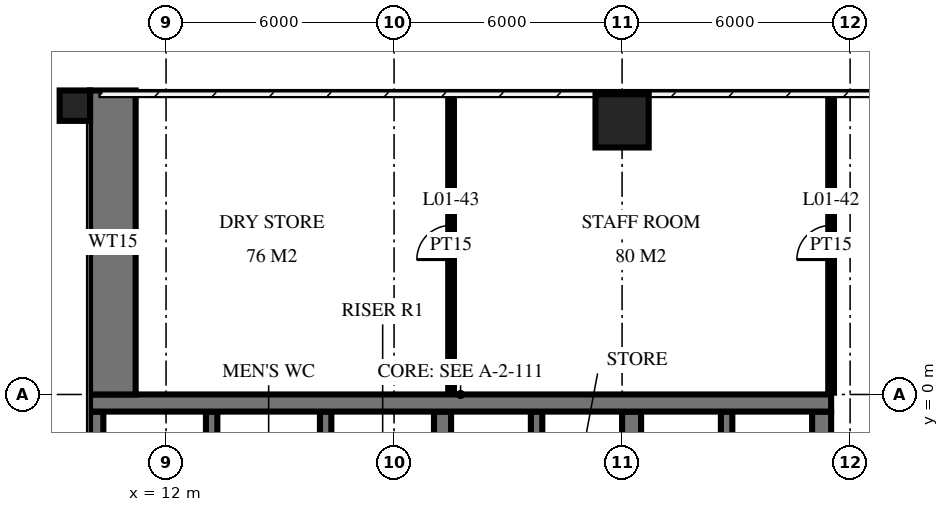
"""IFC4 building model, lengths in metres.
Left out: names, types, materials, properties, quantities, classifications, styles, units other than length and angle.
Written with IfcOpenShell. Run it as: python <this file> out.ifc"""

import sys

from ifc_helpers import new_model, si_unit, direction, frame, frame_2d, origin, origin_2d, place, context, subcontext, project, spatial, rectangle, circle, extrude, element, fill, save


model = new_model("IFC4")
c1 = context("Model", 3, precision=1e-05, world=origin(), true_north=direction((0.0, 1.0)))
c2 = subcontext(c1, "Body", "Model", "MODEL_VIEW")
j1 = project(units=[si_unit("LENGTHUNIT", "METRE"), si_unit("PLANEANGLEUNIT", "RADIAN")], contexts=[c1])
p1 = place(None, origin())
s1 = spatial("IfcSite", under=j1, at=p1, CompositionType="ELEMENT")
p2 = place(p1, origin())
s2 = spatial("IfcBuilding", under=s1, at=p2, CompositionType="ELEMENT")
p3 = place(p2, frame((0.0, 0.0, 7.0)))
s3 = spatial("IfcBuildingStorey", under=s2, at=p3, CompositionType="ELEMENT", Elevation=7.0)
p4 = place(p3, frame((24.0, 7.2, 0.0), z_axis=(0.0, 0.0, 1.0), x_axis=(1.0, 0.0, 0.0)))
e1 = element("IfcColumn", 1, at=p4, inside=s3, PredefinedType="COLUMN", context=c2, shape_type="SweptSolid", body=[
    extrude(circle(Radius=0.7, at=origin_2d()), origin(), (0.0, 0.0, 1.0), 5.5),
])
p5 = place(p3, frame((10.0, -0.225, 0.0), z_axis=(0.0, 0.0, 1.0), x_axis=(1.0, 0.0, 0.0)))
e2 = element("IfcWall", 2, at=p5, inside=s3, PredefinedType="SHEAR", context=c2, shape_type="SweptSolid", body=[
    extrude(rectangle(XDim=19.5, YDim=0.45, at=frame_2d((9.75, 0.0))), origin(), (0.0, 0.0, 1.0), 5.5),
])
p6 = place(p3, frame((10.175, -14.55, 0.0), z_axis=(0.0, 0.0, 1.0), x_axis=(0.0, 1.0, 0.0)))
e3 = element("IfcWall", 3, at=p6, inside=s3, PredefinedType="SHEAR", context=c2, shape_type="SweptSolid", body=[
    extrude(rectangle(XDim=14.1, YDim=0.35, at=frame_2d((7.05, 0.0))), origin(), (0.0, 0.0, 1.0), 5.5),
])
p7 = place(p3, frame((29.25, -14.55, 0.0), z_axis=(0.0, 0.0, 1.0), x_axis=(0.0, 1.0, 0.0)))
e4 = element("IfcWall", 4, at=p7, inside=s3, PredefinedType="SHEAR", context=c2, shape_type="SweptSolid", body=[
    extrude(rectangle(XDim=14.1, YDim=0.5, at=frame_2d((7.05, 0.0))), origin(), (0.0, 0.0, 1.0), 5.5),
])
p8 = place(p7, frame((8.4, 0.0, 0.0)))
e5 = element("IfcOpeningElement", 5, at=p8, cuts=e4, PredefinedType="OPENING", context=c2, shape_type="SweptSolid", body=[
    extrude(rectangle(XDim=1.4, YDim=2.4, at=frame_2d((0.7, 1.2))), frame((0.0, 0.26, 0.0), z_axis=(0.0, -1.0, 0.0), x_axis=(1.0, 0.0, 0.0)), (0.0, 0.0, 1.0), 0.52),
])
p9 = place(p7, frame((10.0, 0.0, 0.0)))
e6 = element("IfcOpeningElement", 6, at=p9, cuts=e4, PredefinedType="OPENING", context=c2, shape_type="SweptSolid", body=[
    extrude(rectangle(XDim=1.4, YDim=2.4, at=frame_2d((0.7, 1.2))), frame((0.0, 0.26, 0.0), z_axis=(0.0, -1.0, 0.0), x_axis=(1.0, 0.0, 0.0)), (0.0, 0.0, 1.0), 0.52),
])
for number, where, z_axis, x_axis in (
    (7, (13.2, -2.75, 0.0), (0.0, 0.0, 1.0), (0.0, 1.0, 0.0)),
    (8, (16.2, -2.75, 0.0), (0.0, 0.0, 1.0), (0.0, 1.0, 0.0)),
):
    element("IfcWall", number, at=place(p3, frame(where, z_axis=z_axis, x_axis=x_axis)), inside=s3, PredefinedType="SHEAR", context=c2, shape_type="SweptSolid", body=[
        extrude(rectangle(XDim=2.3, YDim=0.3, at=frame_2d((1.15, 0.0))), origin(), (0.0, 0.0, 1.0), 5.5),
    ])
p10 = place(p3, frame((19.275, -2.75, 0.0), z_axis=(0.0, 0.0, 1.0), x_axis=(0.0, 1.0, 0.0)))
e9 = element("IfcWall", 9, at=p10, inside=s3, PredefinedType="SHEAR", context=c2, shape_type="SweptSolid", body=[
    extrude(rectangle(XDim=2.3, YDim=0.45, at=frame_2d((1.15, 0.0))), origin(), (0.0, 0.0, 1.0), 5.5),
])
p11 = place(p3, frame((21.75, -2.75, 0.0), z_axis=(0.0, 0.0, 1.0), x_axis=(0.0, 1.0, 0.0)))
e10 = element("IfcWall", 10, at=p11, inside=s3, PredefinedType="SHEAR", context=c2, shape_type="SweptSolid", body=[
    extrude(rectangle(XDim=2.3, YDim=0.3, at=frame_2d((1.15, 0.0))), origin(), (0.0, 0.0, 1.0), 5.5),
])
p12 = place(p3, frame((24.25, -2.75, 0.0), z_axis=(0.0, 0.0, 1.0), x_axis=(0.0, 1.0, 0.0)))
e11 = element("IfcWall", 11, at=p12, inside=s3, PredefinedType="SHEAR", context=c2, shape_type="SweptSolid", body=[
    extrude(rectangle(XDim=2.3, YDim=0.5, at=frame_2d((1.15, 0.0))), origin(), (0.0, 0.0, 1.0), 5.5),
])
p13 = place(p3, frame((26.75, -2.75, 0.0), z_axis=(0.0, 0.0, 1.0), x_axis=(0.0, 1.0, 0.0)))
e12 = element("IfcWall", 12, at=p13, inside=s3, PredefinedType="SHEAR", context=c2, shape_type="SweptSolid", body=[
    extrude(rectangle(XDim=2.3, YDim=0.3, at=frame_2d((1.15, 0.0))), origin(), (0.0, 0.0, 1.0), 5.5),
])
p14 = place(p3, frame((10.6, 0.0, 0.0), z_axis=(0.0, 0.0, 1.0), x_axis=(0.0, 1.0, 0.0)))
e13 = element("IfcWall", 13, at=p14, inside=s3, PredefinedType="SHEAR", context=c2, shape_type="SweptSolid", body=[
    extrude(rectangle(XDim=8.0, YDim=1.2, at=frame_2d((4.0, 0.0))), origin(), (0.0, 0.0, 1.0), 5.5),
])
p15 = place(p3, frame((9.6, 7.6, 0.0), z_axis=(0.0, 0.0, 1.0), x_axis=(1.0, 0.0, 0.0)))
e14 = element("IfcColumn", 14, at=p15, inside=s3, PredefinedType="COLUMN", context=c2, shape_type="SweptSolid", body=[
    extrude(rectangle(XDim=0.8, YDim=0.8, at=origin_2d()), origin(), (0.0, 0.0, 1.0), 5.5),
])
p16 = place(p3, frame((29.5, 0.05, 0.0), z_axis=(0.0, 0.0, 1.0), x_axis=(0.0, 1.0, 0.0)))
e15 = element("IfcWall", 15, at=p16, inside=s3, PredefinedType="PARTITIONING", context=c2, shape_type="SweptSolid", body=[
    extrude(rectangle(XDim=7.77, YDim=0.15, at=frame_2d((3.885, 0.0))), origin(), (0.0, 0.0, 1.0), 5.05),
])
p17 = place(p16, frame((3.5, 0.0, 0.0)))
e16 = element("IfcOpeningElement", 16, at=p17, cuts=e15, PredefinedType="OPENING", context=c2, shape_type="SweptSolid", body=[
    extrude(rectangle(XDim=0.9, YDim=2.1, at=frame_2d((0.45, 1.05))), frame((0.0, 0.085, 0.0), z_axis=(0.0, -1.0, 0.0), x_axis=(1.0, 0.0, 0.0)), (0.0, 0.0, 1.0), 0.17),
])
p18 = place(p3, frame((19.5, 0.05, 0.0), z_axis=(0.0, 0.0, 1.0), x_axis=(0.0, 1.0, 0.0)))
e17 = element("IfcWall", 17, at=p18, inside=s3, PredefinedType="PARTITIONING", context=c2, shape_type="SweptSolid", body=[
    extrude(rectangle(XDim=7.77, YDim=0.15, at=frame_2d((3.885, 0.0))), origin(), (0.0, 0.0, 1.0), 5.05),
])
p19 = place(p18, frame((3.5, 0.0, 0.0)))
e18 = element("IfcOpeningElement", 18, at=p19, cuts=e17, PredefinedType="OPENING", context=c2, shape_type="SweptSolid", body=[
    extrude(rectangle(XDim=0.9, YDim=2.1, at=frame_2d((0.45, 1.05))), frame((0.0, 0.085, 0.0), z_axis=(0.0, -1.0, 0.0), x_axis=(1.0, 0.0, 0.0)), (0.0, 0.0, 1.0), 0.17),
])
p20 = place(p17, origin())
e19 = element("IfcDoor", 19, at=p20, inside=s3, OperationType="SINGLE_SWING_RIGHT", PredefinedType="DOOR", context=c2, shape_type="SweptSolid", body=[
    extrude(rectangle(XDim=0.9, YDim=2.1, at=frame_2d((0.45, 1.05))), frame((0.0, 0.025, 0.0), z_axis=(0.0, -1.0, 0.0), x_axis=(1.0, 0.0, 0.0)), (0.0, 0.0, 1.0), 0.05),
])
fill(e16, e19)
p21 = place(p19, origin())
e20 = element("IfcDoor", 20, at=p21, inside=s3, OperationType="SINGLE_SWING_RIGHT", PredefinedType="DOOR", context=c2, shape_type="SweptSolid", body=[
    extrude(rectangle(XDim=0.9, YDim=2.1, at=frame_2d((0.45, 1.05))), frame((0.0, 0.025, 0.0), z_axis=(0.0, -1.0, 0.0), x_axis=(1.0, 0.0, 0.0)), (0.0, 0.0, 1.0), 0.05),
])
fill(e18, e20)
save(model, sys.argv[1])
